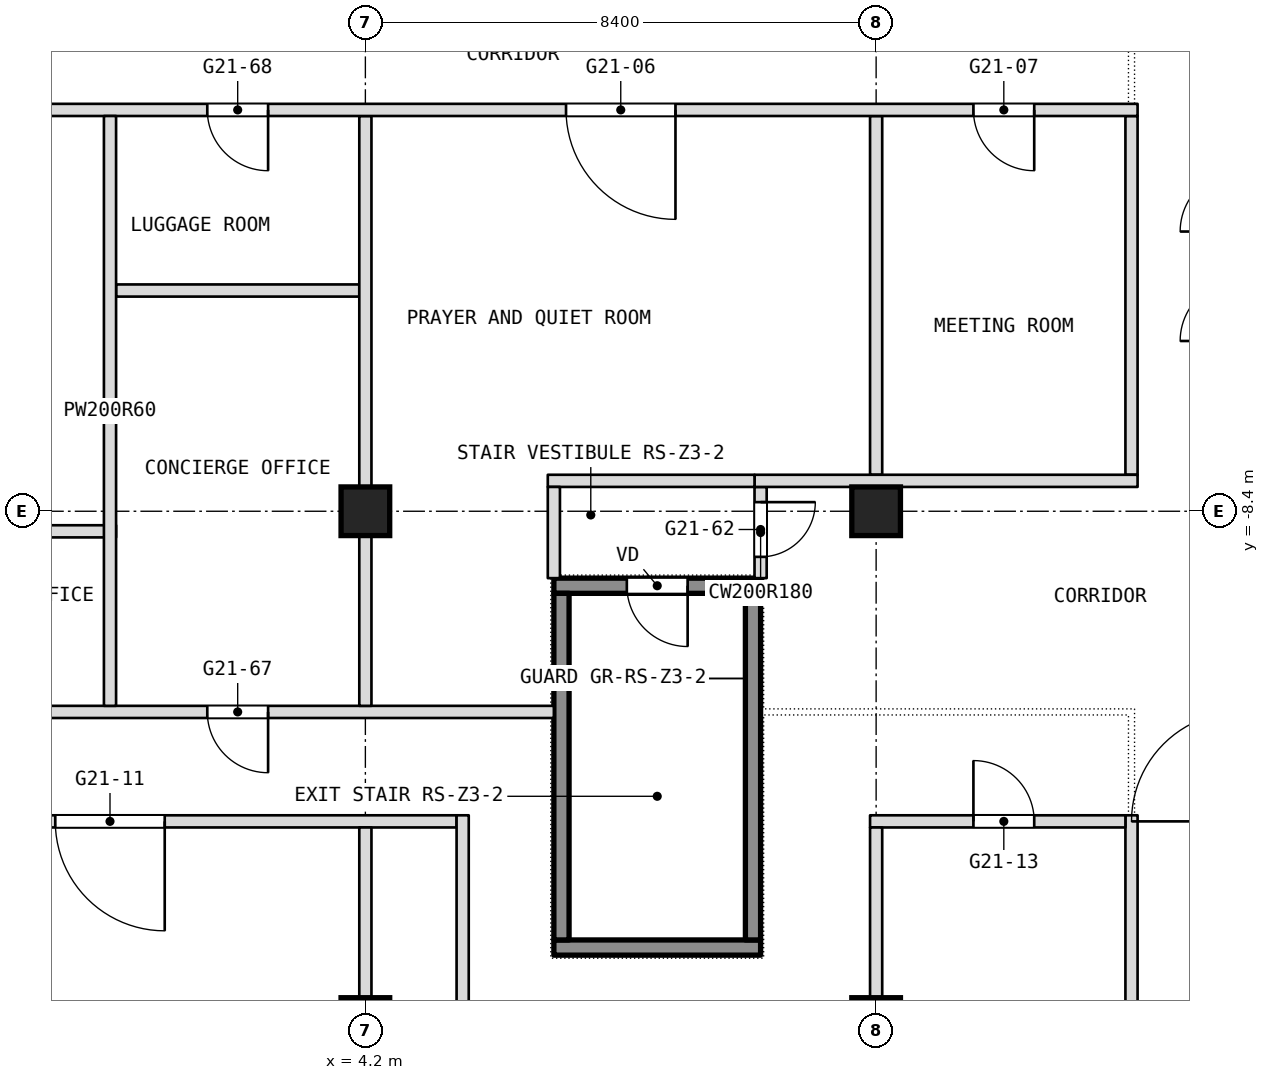
"""IFC4 building model, lengths in metres.
Left out: names, types, materials, properties, quantities, classifications, styles, units other than length and angle.
Written with IfcOpenShell. Run it as: python <this file> out.ifc"""

import sys

from ifc_helpers import new_model, si_unit, direction, frame, frame_2d, origin, origin_2d, place, context, subcontext, project, spatial, rectangle, extrude, element, fill, save


model = new_model("IFC4")
c1 = context("Model", 3, precision=1e-05, world=origin(), true_north=direction((0.0, 1.0)))
c2 = subcontext(c1, "Body", "Model", "MODEL_VIEW")
j1 = project(units=[si_unit("LENGTHUNIT", "METRE"), si_unit("PLANEANGLEUNIT", "RADIAN")], contexts=[c1])
p1 = place(None, origin())
s1 = spatial("IfcSite", under=j1, at=p1, CompositionType="ELEMENT")
p2 = place(p1, origin())
s2 = spatial("IfcBuilding", under=s1, at=p2, CompositionType="ELEMENT")
p3 = place(p2, frame((0.0, 0.0, 248.9)))
s3 = spatial("IfcBuildingStorey", under=s2, at=p3, CompositionType="ELEMENT", Elevation=248.9)
for number, where, z_axis, x_axis in (
    (1, (4.2, -16.8, 0.0), (0.0, 0.0, 1.0), (1.0, 0.0, 0.0)),
    (2, (4.2, -8.4, 0.0), (0.0, 0.0, 1.0), (1.0, 0.0, 0.0)),
    (3, (12.6, -16.8, 0.0), (0.0, 0.0, 1.0), (1.0, 0.0, 0.0)),
    (4, (12.6, -8.4, 0.0), (0.0, 0.0, 1.0), (1.0, 0.0, 0.0)),
):
    element("IfcColumn", number, at=place(p3, frame(where, z_axis=z_axis, x_axis=x_axis)), inside=s3, PredefinedType="COLUMN", context=c2, shape_type="SweptSolid", body=[
        extrude(rectangle(XDim=0.8, YDim=0.8, at=origin_2d()), origin(), (0.0, 0.0, 1.0), 3.6),
    ])
p4 = place(p3, frame((16.8, -20.2, 0.0), z_axis=(0.0, 0.0, 1.0), x_axis=(0.0, 1.0, 0.0)))
e5 = element("IfcWall", 5, at=p4, inside=s3, PredefinedType="PARTITIONING", context=c2, shape_type="SweptSolid", body=[
    extrude(rectangle(XDim=6.8, YDim=0.2, at=frame_2d((3.4, 0.0))), origin(), (0.0, 0.0, 1.0), 3.3),
])
p5 = place(p3, frame((16.8, -7.8, 0.0), z_axis=(0.0, 0.0, 1.0), x_axis=(0.0, 1.0, 0.0)))
e6 = element("IfcWall", 6, at=p5, inside=s3, PredefinedType="PARTITIONING", context=c2, shape_type="SweptSolid", body=[
    extrude(rectangle(XDim=5.9, YDim=0.2, at=frame_2d((2.95, 0.0))), origin(), (0.0, 0.0, 1.0), 3.3),
])
p6 = place(p3, frame((-5.9, -13.5, 0.0), z_axis=(0.0, 0.0, 1.0), x_axis=(1.0, 0.0, 0.0)))
e7 = element("IfcWall", 7, at=p6, inside=s3, PredefinedType="PARTITIONING", context=c2, shape_type="SweptSolid", body=[
    extrude(rectangle(XDim=11.6, YDim=0.2, at=frame_2d((5.8, 0.0))), origin(), (0.0, 0.0, 1.0), 3.3),
])
p7 = place(p6, frame((5.0, 0.0, 0.0)))
e8 = element("IfcOpeningElement", 8, at=p7, cuts=e7, PredefinedType="OPENING", context=c2, shape_type="SweptSolid", body=[
    extrude(rectangle(XDim=1.8, YDim=2.1, at=frame_2d((0.9, 1.05))), frame((0.0, 0.1, 0.0), z_axis=(0.0, -1.0, 0.0), x_axis=(1.0, 0.0, 0.0)), (0.0, 0.0, 1.0), 0.2),
])
p8 = place(p3, frame((12.5, -13.5, 0.0), z_axis=(0.0, 0.0, 1.0), x_axis=(1.0, 0.0, 0.0)))
e9 = element("IfcWall", 9, at=p8, inside=s3, PredefinedType="PARTITIONING", context=c2, shape_type="SweptSolid", body=[
    extrude(rectangle(XDim=4.2, YDim=0.2, at=frame_2d((2.1, 0.0))), origin(), (0.0, 0.0, 1.0), 3.3),
])
p9 = place(p8, frame((1.7, 0.0, 0.0)))
e10 = element("IfcOpeningElement", 10, at=p9, cuts=e9, PredefinedType="OPENING", context=c2, shape_type="SweptSolid", body=[
    extrude(rectangle(XDim=1.0, YDim=2.1, at=frame_2d((0.5, 1.05))), frame((0.0, 0.1, 0.0), z_axis=(0.0, -1.0, 0.0), x_axis=(1.0, 0.0, 0.0)), (0.0, 0.0, 1.0), 0.2),
])
p10 = place(p3, frame((12.6, -7.8, 0.0), z_axis=(0.0, 0.0, 1.0), x_axis=(0.0, 1.0, 0.0)))
e11 = element("IfcWall", 11, at=p10, inside=s3, PredefinedType="PARTITIONING", context=c2, shape_type="SweptSolid", body=[
    extrude(rectangle(XDim=5.9, YDim=0.2, at=frame_2d((2.95, 0.0))), origin(), (0.0, 0.0, 1.0), 2.486),
])
p11 = place(p3, frame((12.6, -18.3, 0.0), z_axis=(0.0, 0.0, 1.0), x_axis=(0.0, 1.0, 0.0)))
e12 = element("IfcWall", 12, at=p11, inside=s3, PredefinedType="PARTITIONING", context=c2, shape_type="SweptSolid", body=[
    extrude(rectangle(XDim=4.7, YDim=0.2, at=frame_2d((2.35, 0.0))), origin(), (0.0, 0.0, 1.0), 2.486),
])
p12 = place(p3, frame((-7.3, -11.7, 0.0), z_axis=(0.0, 0.0, 1.0), x_axis=(1.0, 0.0, 0.0)))
e13 = element("IfcWall", 13, at=p12, inside=s3, PredefinedType="PARTITIONING", context=c2, shape_type="SweptSolid", body=[
    extrude(rectangle(XDim=14.6, YDim=0.2, at=frame_2d((7.3, 0.0))), origin(), (0.0, 0.0, 1.0), 3.3),
])
p13 = place(p12, frame((4.7, 0.0, 0.0)))
e14 = element("IfcOpeningElement", 14, at=p13, cuts=e13, PredefinedType="OPENING", context=c2, shape_type="SweptSolid", body=[
    extrude(rectangle(XDim=1.0, YDim=2.1, at=frame_2d((0.5, 1.05))), frame((0.0, 0.1, 0.0), z_axis=(0.0, -1.0, 0.0), x_axis=(1.0, 0.0, 0.0)), (0.0, 0.0, 1.0), 0.2),
])
p14 = place(p12, frame((8.9, 0.0, 0.0)))
e15 = element("IfcOpeningElement", 15, at=p14, cuts=e13, PredefinedType="OPENING", context=c2, shape_type="SweptSolid", body=[
    extrude(rectangle(XDim=1.0, YDim=2.1, at=frame_2d((0.5, 1.05))), frame((0.0, 0.1, 0.0), z_axis=(0.0, -1.0, 0.0), x_axis=(1.0, 0.0, 0.0)), (0.0, 0.0, 1.0), 0.2),
])
p15 = place(p3, frame((10.7, -9.5, 0.0), z_axis=(0.0, 0.0, 1.0), x_axis=(0.0, 1.0, 0.0)))
e16 = element("IfcWall", 16, at=p15, inside=s3, PredefinedType="PARTITIONING", context=c2, shape_type="SweptSolid", body=[
    extrude(rectangle(XDim=1.5, YDim=0.2, at=frame_2d((0.75, 0.0))), origin(), (0.0, 0.0, 1.0), 3.3),
])
p16 = place(p15, frame((0.35, 0.0, 0.0)))
e17 = element("IfcOpeningElement", 17, at=p16, cuts=e16, PredefinedType="OPENING", context=c2, shape_type="SweptSolid", body=[
    extrude(rectangle(XDim=0.9, YDim=2.1, at=frame_2d((0.45, 1.05))), frame((0.0, 0.1, 0.0), z_axis=(0.0, -1.0, 0.0), x_axis=(1.0, 0.0, 0.0)), (0.0, 0.0, 1.0), 0.2),
])
p17 = place(p3, frame((-4.1, -8.73, 0.0), z_axis=(0.0, 0.0, 1.0), x_axis=(1.0, 0.0, 0.0)))
e18 = element("IfcWall", 18, at=p17, inside=s3, PredefinedType="PARTITIONING", context=c2, shape_type="SweptSolid", body=[
    extrude(rectangle(XDim=4.2, YDim=0.2, at=frame_2d((2.1, 0.0))), origin(), (0.0, 0.0, 1.0), 3.3),
])
p18 = place(p3, frame((10.6, -7.9, 0.0), z_axis=(0.0, 0.0, 1.0), x_axis=(1.0, 0.0, 0.0)))
e19 = element("IfcWall", 19, at=p18, inside=s3, PredefinedType="PARTITIONING", context=c2, shape_type="SweptSolid", body=[
    extrude(rectangle(XDim=6.3, YDim=0.2, at=frame_2d((3.15, 0.0))), origin(), (0.0, 0.0, 1.0), 3.3),
])
p19 = place(p3, frame((7.2, -7.9, 0.0), z_axis=(0.0, 0.0, 1.0), x_axis=(1.0, 0.0, 0.0)))
e20 = element("IfcWall", 20, at=p19, inside=s3, PredefinedType="PARTITIONING", context=c2, shape_type="SweptSolid", body=[
    extrude(rectangle(XDim=3.4, YDim=0.2, at=frame_2d((1.7, 0.0))), origin(), (0.0, 0.0, 1.0), 3.3),
])
p20 = place(p3, frame((7.3, -9.5, 0.0), z_axis=(0.0, 0.0, 1.0), x_axis=(0.0, 1.0, 0.0)))
e21 = element("IfcWall", 21, at=p20, inside=s3, PredefinedType="PARTITIONING", context=c2, shape_type="SweptSolid", body=[
    extrude(rectangle(XDim=1.5, YDim=0.2, at=frame_2d((0.75, 0.0))), origin(), (0.0, 0.0, 1.0), 3.3),
])
p21 = place(p3, frame((5.8, -18.3, 0.0), z_axis=(0.0, 0.0, 1.0), x_axis=(0.0, 1.0, 0.0)))
e22 = element("IfcWall", 22, at=p21, inside=s3, PredefinedType="PARTITIONING", context=c2, shape_type="SweptSolid", body=[
    extrude(rectangle(XDim=4.9, YDim=0.2, at=frame_2d((2.45, 0.0))), origin(), (0.0, 0.0, 1.0), 3.3),
])
p22 = place(p3, frame((0.1, -4.77, 0.0), z_axis=(0.0, 0.0, 1.0), x_axis=(1.0, 0.0, 0.0)))
e23 = element("IfcWall", 23, at=p22, inside=s3, PredefinedType="PARTITIONING", context=c2, shape_type="SweptSolid", body=[
    extrude(rectangle(XDim=4.0, YDim=0.2, at=frame_2d((2.0, 0.0))), origin(), (0.0, 0.0, 1.0), 3.3),
])
p23 = place(p3, frame((4.2, -20.0, 0.0), z_axis=(0.0, 0.0, 1.0), x_axis=(0.0, 1.0, 0.0)))
e24 = element("IfcWall", 24, at=p23, inside=s3, PredefinedType="PARTITIONING", context=c2, shape_type="SweptSolid", body=[
    extrude(rectangle(XDim=6.4, YDim=0.2, at=frame_2d((3.2, 0.0))), origin(), (0.0, 0.0, 1.0), 2.486),
])
p24 = place(p3, frame((4.2, -11.6, 0.0), z_axis=(0.0, 0.0, 1.0), x_axis=(0.0, 1.0, 0.0)))
e25 = element("IfcWall", 25, at=p24, inside=s3, PredefinedType="PARTITIONING", context=c2, shape_type="SweptSolid", body=[
    extrude(rectangle(XDim=9.7, YDim=0.2, at=frame_2d((4.85, 0.0))), origin(), (0.0, 0.0, 1.0), 2.486),
])
p25 = place(p3, frame((-16.9, -1.8, 0.0), z_axis=(0.0, 0.0, 1.0), x_axis=(1.0, 0.0, 0.0)))
e26 = element("IfcWall", 26, at=p25, inside=s3, PredefinedType="PARTITIONING", context=c2, shape_type="SweptSolid", body=[
    extrude(rectangle(XDim=33.8, YDim=0.2, at=frame_2d((16.9, 0.0))), origin(), (0.0, 0.0, 1.0), 3.3),
])
p26 = place(p25, frame((1.7, 0.0, 0.0)))
e27 = element("IfcOpeningElement", 27, at=p26, cuts=e26, PredefinedType="OPENING", context=c2, shape_type="SweptSolid", body=[
    extrude(rectangle(XDim=1.0, YDim=2.1, at=frame_2d((0.5, 1.05))), frame((0.0, 0.1, 0.0), z_axis=(0.0, -1.0, 0.0), x_axis=(1.0, 0.0, 0.0)), (0.0, 0.0, 1.0), 0.2),
])
p27 = place(p25, frame((5.9, 0.0, 0.0)))
e28 = element("IfcOpeningElement", 28, at=p27, cuts=e26, PredefinedType="OPENING", context=c2, shape_type="SweptSolid", body=[
    extrude(rectangle(XDim=1.0, YDim=2.1, at=frame_2d((0.5, 1.05))), frame((0.0, 0.1, 0.0), z_axis=(0.0, -1.0, 0.0), x_axis=(1.0, 0.0, 0.0)), (0.0, 0.0, 1.0), 0.2),
])
p28 = place(p25, frame((10.1, 0.0, 0.0)))
e29 = element("IfcOpeningElement", 29, at=p28, cuts=e26, PredefinedType="OPENING", context=c2, shape_type="SweptSolid", body=[
    extrude(rectangle(XDim=1.0, YDim=2.1, at=frame_2d((0.5, 1.05))), frame((0.0, 0.1, 0.0), z_axis=(0.0, -1.0, 0.0), x_axis=(1.0, 0.0, 0.0)), (0.0, 0.0, 1.0), 0.2),
])
p29 = place(p25, frame((24.4, 0.0, 0.0)))
e30 = element("IfcOpeningElement", 30, at=p29, cuts=e26, PredefinedType="OPENING", context=c2, shape_type="SweptSolid", body=[
    extrude(rectangle(XDim=1.8, YDim=2.1, at=frame_2d((0.9, 1.05))), frame((0.0, 0.1, 0.0), z_axis=(0.0, -1.0, 0.0), x_axis=(1.0, 0.0, 0.0)), (0.0, 0.0, 1.0), 0.2),
])
p30 = place(p25, frame((31.1, 0.0, 0.0)))
e31 = element("IfcOpeningElement", 31, at=p30, cuts=e26, PredefinedType="OPENING", context=c2, shape_type="SweptSolid", body=[
    extrude(rectangle(XDim=1.0, YDim=2.1, at=frame_2d((0.5, 1.05))), frame((0.0, 0.1, 0.0), z_axis=(0.0, -1.0, 0.0), x_axis=(1.0, 0.0, 0.0)), (0.0, 0.0, 1.0), 0.2),
])
p31 = place(p25, frame((14.3, 0.0, 0.0)))
e32 = element("IfcOpeningElement", 32, at=p31, cuts=e26, PredefinedType="OPENING", context=c2, shape_type="SweptSolid", body=[
    extrude(rectangle(XDim=1.0, YDim=2.1, at=frame_2d((0.5, 1.05))), frame((0.0, 0.1, 0.0), z_axis=(0.0, -1.0, 0.0), x_axis=(1.0, 0.0, 0.0)), (0.0, 0.0, 1.0), 0.2),
])
p32 = place(p25, frame((18.5, 0.0, 0.0)))
e33 = element("IfcOpeningElement", 33, at=p32, cuts=e26, PredefinedType="OPENING", context=c2, shape_type="SweptSolid", body=[
    extrude(rectangle(XDim=1.0, YDim=2.1, at=frame_2d((0.5, 1.05))), frame((0.0, 0.1, 0.0), z_axis=(0.0, -1.0, 0.0), x_axis=(1.0, 0.0, 0.0)), (0.0, 0.0, 1.0), 0.2),
])
p33 = place(p3, frame((0.0, -11.6, 0.0), z_axis=(0.0, 0.0, 1.0), x_axis=(0.0, 1.0, 0.0)))
e34 = element("IfcWall", 34, at=p33, inside=s3, PredefinedType="PARTITIONING", context=c2, shape_type="SweptSolid", body=[
    extrude(rectangle(XDim=9.7, YDim=0.2, at=frame_2d((4.85, 0.0))), origin(), (0.0, 0.0, 1.0), 3.3),
])
p34 = place(p3, frame((7.3, -15.575, 0.1), z_axis=(0.0, 0.0, 1.0), x_axis=(1.0, 0.0, 0.0)))
e35 = element("IfcWall", 35, at=p34, inside=s3, PredefinedType="SHEAR", context=c2, shape_type="SweptSolid", body=[
    extrude(rectangle(XDim=3.4, YDim=0.25, at=frame_2d((1.7, 0.0))), origin(), (0.0, 0.0, 1.0), 3.2),
])
p35 = place(p3, frame((7.3, -9.625, 0.1), z_axis=(0.0, 0.0, 1.0), x_axis=(1.0, 0.0, 0.0)))
e36 = element("IfcWall", 36, at=p35, inside=s3, PredefinedType="SHEAR", context=c2, shape_type="SweptSolid", body=[
    extrude(rectangle(XDim=3.4, YDim=0.25, at=frame_2d((1.7, 0.0))), origin(), (0.0, 0.0, 1.0), 3.2),
])
p36 = place(p35, frame((1.2, 0.0, 0.0)))
e37 = element("IfcOpeningElement", 37, at=p36, cuts=e36, PredefinedType="OPENING", context=c2, shape_type="SweptSolid", body=[
    extrude(rectangle(XDim=1.0, YDim=2.1, at=frame_2d((0.5, 1.05))), frame((0.0, 0.125, 0.0), z_axis=(0.0, -1.0, 0.0), x_axis=(1.0, 0.0, 0.0)), (0.0, 0.0, 1.0), 0.25),
])
for number, where, z_axis, x_axis in (
    (38, (7.425, -15.45, 0.1), (0.0, 0.0, 1.0), (0.0, 1.0, 0.0)),
    (39, (10.575, -15.45, 0.1), (0.0, 0.0, 1.0), (0.0, 1.0, 0.0)),
):
    element("IfcWall", number, at=place(p3, frame(where, z_axis=z_axis, x_axis=x_axis)), inside=s3, PredefinedType="SHEAR", context=c2, shape_type="SweptSolid", body=[
        extrude(rectangle(XDim=5.7, YDim=0.25, at=frame_2d((2.85, 0.0))), origin(), (0.0, 0.0, 1.0), 3.2),
    ])
p37 = place(p7, origin())
e40 = element("IfcDoor", 40, at=p37, inside=s3, OperationType="DOUBLE_DOOR_SINGLE_SWING", PredefinedType="DOOR", context=c2, shape_type="SweptSolid", body=[
    extrude(rectangle(XDim=1.8, YDim=2.1, at=frame_2d((0.9, 1.05))), frame((0.0, 0.025, 0.0), z_axis=(0.0, -1.0, 0.0), x_axis=(1.0, 0.0, 0.0)), (0.0, 0.0, 1.0), 0.05),
])
fill(e8, e40)
p38 = place(p9, origin())
e41 = element("IfcDoor", 41, at=p38, inside=s3, OperationType="SINGLE_SWING_LEFT", PredefinedType="DOOR", context=c2, shape_type="SweptSolid", body=[
    extrude(rectangle(XDim=1.0, YDim=2.1, at=frame_2d((0.5, 1.05))), frame((0.0, 0.025, 0.0), z_axis=(0.0, -1.0, 0.0), x_axis=(1.0, 0.0, 0.0)), (0.0, 0.0, 1.0), 0.05),
])
fill(e10, e41)
p39 = place(p14, origin())
e42 = element("IfcDoor", 42, at=p39, inside=s3, OperationType="SINGLE_SWING_LEFT", PredefinedType="DOOR", context=c2, shape_type="SweptSolid", body=[
    extrude(rectangle(XDim=1.0, YDim=2.1, at=frame_2d((0.5, 1.05))), frame((0.0, 0.025, 0.0), z_axis=(0.0, -1.0, 0.0), x_axis=(1.0, 0.0, 0.0)), (0.0, 0.0, 1.0), 0.05),
])
fill(e15, e42)
p40 = place(p16, origin())
e43 = element("IfcDoor", 43, at=p40, inside=s3, OperationType="SINGLE_SWING_RIGHT", PredefinedType="DOOR", context=c2, shape_type="SweptSolid", body=[
    extrude(rectangle(XDim=0.9, YDim=2.1, at=frame_2d((0.45, 1.05))), frame((0.0, 0.025, 0.0), z_axis=(0.0, -1.0, 0.0), x_axis=(1.0, 0.0, 0.0)), (0.0, 0.0, 1.0), 0.05),
])
fill(e17, e43)
p41 = place(p29, origin())
e44 = element("IfcDoor", 44, at=p41, inside=s3, OperationType="DOUBLE_DOOR_SINGLE_SWING", PredefinedType="DOOR", context=c2, shape_type="SweptSolid", body=[
    extrude(rectangle(XDim=1.8, YDim=2.1, at=frame_2d((0.9, 1.05))), frame((0.0, 0.025, 0.0), z_axis=(0.0, -1.0, 0.0), x_axis=(1.0, 0.0, 0.0)), (0.0, 0.0, 1.0), 0.05),
])
fill(e30, e44)
p42 = place(p30, origin())
e45 = element("IfcDoor", 45, at=p42, inside=s3, OperationType="SINGLE_SWING_RIGHT", PredefinedType="DOOR", context=c2, shape_type="SweptSolid", body=[
    extrude(rectangle(XDim=1.0, YDim=2.1, at=frame_2d((0.5, 1.05))), frame((0.0, 0.025, 0.0), z_axis=(0.0, -1.0, 0.0), x_axis=(1.0, 0.0, 0.0)), (0.0, 0.0, 1.0), 0.05),
])
fill(e31, e45)
p43 = place(p32, origin())
e46 = element("IfcDoor", 46, at=p43, inside=s3, OperationType="SINGLE_SWING_LEFT", PredefinedType="DOOR", context=c2, shape_type="SweptSolid", body=[
    extrude(rectangle(XDim=1.0, YDim=2.1, at=frame_2d((0.5, 1.05))), frame((0.0, 0.025, 0.0), z_axis=(0.0, -1.0, 0.0), x_axis=(1.0, 0.0, 0.0)), (0.0, 0.0, 1.0), 0.05),
])
fill(e33, e46)
p44 = place(p36, origin())
e47 = element("IfcDoor", 47, at=p44, inside=s3, OperationType="SINGLE_SWING_LEFT", PredefinedType="DOOR", context=c2, shape_type="SweptSolid", body=[
    extrude(rectangle(XDim=1.0, YDim=2.1, at=frame_2d((0.5, 1.05))), frame((0.0, 0.025, 0.0), z_axis=(0.0, -1.0, 0.0), x_axis=(1.0, 0.0, 0.0)), (0.0, 0.0, 1.0), 0.05),
])
fill(e37, e47)
save(model, sys.argv[1])
